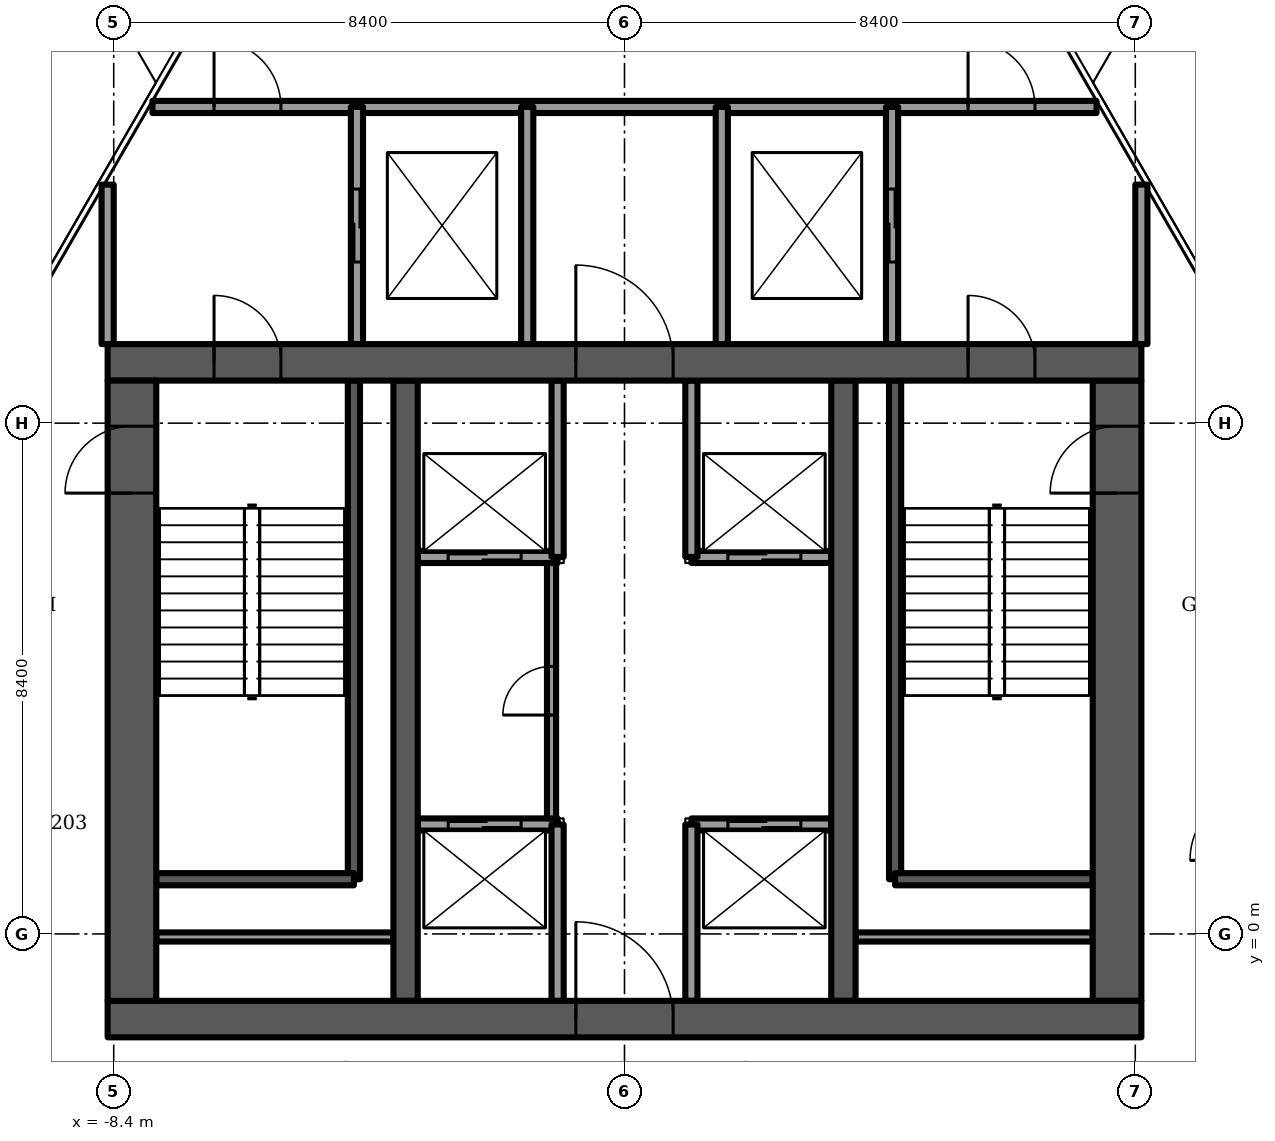
"""IFC4 building model, lengths in metres.
Left out: names, types, materials, properties, quantities, classifications, styles, units other than length and angle.
Written with IfcOpenShell. Run it as: python <this file> out.ifc"""

import sys

from ifc_helpers import new_model, si_unit, direction, frame, frame_2d, origin, place, context, subcontext, project, spatial, rectangle, extrude, element, fill, save


model = new_model("IFC4")
c1 = context("Model", 3, precision=1e-05, world=origin(), true_north=direction((0.0, 1.0)))
c2 = subcontext(c1, "Body", "Model", "MODEL_VIEW")
j1 = project(units=[si_unit("LENGTHUNIT", "METRE"), si_unit("PLANEANGLEUNIT", "RADIAN")], contexts=[c1])
p1 = place(None, origin())
s1 = spatial("IfcSite", under=j1, at=p1, CompositionType="ELEMENT")
p2 = place(p1, origin())
s2 = spatial("IfcBuilding", under=s1, at=p2, CompositionType="ELEMENT")
p3 = place(p2, frame((0.0, 0.0, 237.0)))
s3 = spatial("IfcBuildingStorey", under=s2, at=p3, CompositionType="ELEMENT", Elevation=237.0)
p4 = place(p3, frame((-8.5, -1.4, -0.3), z_axis=(0.0, 0.0, 1.0), x_axis=(1.0, 0.0, 0.0)))
e1 = element("IfcWall", 1, at=p4, inside=s3, PredefinedType="SHEAR", context=c2, shape_type="SweptSolid", body=[
    extrude(rectangle(XDim=17.0, YDim=0.6, at=frame_2d((8.5, 0.0))), origin(), (0.0, 0.0, 1.0), 8.0),
])
p5 = place(p4, frame((7.7, 0.0, 0.0)))
e2 = element("IfcOpeningElement", 2, at=p5, cuts=e1, PredefinedType="OPENING", context=c2, shape_type="SweptSolid", body=[
    extrude(rectangle(XDim=1.6, YDim=2.1, at=frame_2d((0.8, 1.05))), frame((0.0, 0.3, 0.0), z_axis=(0.0, -1.0, 0.0), x_axis=(1.0, 0.0, 0.0)), (0.0, 0.0, 1.0), 0.6),
])
p6 = place(p3, frame((-8.5, 9.4, -0.3), z_axis=(0.0, 0.0, 1.0), x_axis=(1.0, 0.0, 0.0)))
e3 = element("IfcWall", 3, at=p6, inside=s3, PredefinedType="SHEAR", context=c2, shape_type="SweptSolid", body=[
    extrude(rectangle(XDim=17.0, YDim=0.6, at=frame_2d((8.5, 0.0))), origin(), (0.0, 0.0, 1.0), 8.0),
])
p7 = place(p6, frame((7.7, 0.0, 0.0)))
e4 = element("IfcOpeningElement", 4, at=p7, cuts=e3, PredefinedType="OPENING", context=c2, shape_type="SweptSolid", body=[
    extrude(rectangle(XDim=1.6, YDim=2.1, at=frame_2d((0.8, 1.05))), frame((0.0, 0.3, 0.0), z_axis=(0.0, -1.0, 0.0), x_axis=(1.0, 0.0, 0.0)), (0.0, 0.0, 1.0), 0.6),
])
p8 = place(p6, frame((1.75, 0.0, 0.0)))
e5 = element("IfcOpeningElement", 5, at=p8, cuts=e3, PredefinedType="OPENING", context=c2, shape_type="SweptSolid", body=[
    extrude(rectangle(XDim=1.1, YDim=2.1, at=frame_2d((0.55, 1.05))), frame((0.0, 0.3, 0.0), z_axis=(0.0, -1.0, 0.0), x_axis=(1.0, 0.0, 0.0)), (0.0, 0.0, 1.0), 0.6),
])
p9 = place(p6, frame((14.15, 0.0, 0.0)))
e6 = element("IfcOpeningElement", 6, at=p9, cuts=e3, PredefinedType="OPENING", context=c2, shape_type="SweptSolid", body=[
    extrude(rectangle(XDim=1.1, YDim=2.1, at=frame_2d((0.55, 1.05))), frame((0.0, 0.3, 0.0), z_axis=(0.0, -1.0, 0.0), x_axis=(1.0, 0.0, 0.0)), (0.0, 0.0, 1.0), 0.6),
])
p10 = place(p3, frame((-8.1, -1.1, -0.3), z_axis=(0.0, 0.0, 1.0), x_axis=(0.0, 1.0, 0.0)))
e7 = element("IfcWall", 7, at=p10, inside=s3, PredefinedType="SHEAR", context=c2, shape_type="SweptSolid", body=[
    extrude(rectangle(XDim=10.2, YDim=0.8, at=frame_2d((5.1, 0.0))), origin(), (0.0, 0.0, 1.0), 8.0),
])
p11 = place(p10, frame((8.35, 0.0, 0.0)))
e8 = element("IfcOpeningElement", 8, at=p11, cuts=e7, PredefinedType="OPENING", context=c2, shape_type="SweptSolid", body=[
    extrude(rectangle(XDim=1.1, YDim=2.1, at=frame_2d((0.55, 1.05))), frame((0.0, 0.4, 0.0), z_axis=(0.0, -1.0, 0.0), x_axis=(1.0, 0.0, 0.0)), (0.0, 0.0, 1.0), 0.8),
])
p12 = place(p3, frame((8.1, -1.1, -0.3), z_axis=(0.0, 0.0, 1.0), x_axis=(0.0, 1.0, 0.0)))
e9 = element("IfcWall", 9, at=p12, inside=s3, PredefinedType="SHEAR", context=c2, shape_type="SweptSolid", body=[
    extrude(rectangle(XDim=10.2, YDim=0.8, at=frame_2d((5.1, 0.0))), origin(), (0.0, 0.0, 1.0), 8.0),
])
p13 = place(p12, frame((8.35, 0.0, 0.0)))
e10 = element("IfcOpeningElement", 10, at=p13, cuts=e9, PredefinedType="OPENING", context=c2, shape_type="SweptSolid", body=[
    extrude(rectangle(XDim=1.1, YDim=2.1, at=frame_2d((0.55, 1.05))), frame((0.0, 0.4, 0.0), z_axis=(0.0, -1.0, 0.0), x_axis=(1.0, 0.0, 0.0)), (0.0, 0.0, 1.0), 0.8),
])
for number, where, z_axis, x_axis in (
    (11, (-3.6, -1.1, -0.3), (0.0, 0.0, 1.0), (0.0, 1.0, 0.0)),
    (12, (3.6, -1.1, -0.3), (0.0, 0.0, 1.0), (0.0, 1.0, 0.0)),
):
    element("IfcWall", number, at=place(p3, frame(where, z_axis=z_axis, x_axis=x_axis)), inside=s3, PredefinedType="SHEAR", context=c2, shape_type="SweptSolid", body=[
        extrude(rectangle(XDim=10.2, YDim=0.4, at=frame_2d((5.1, 0.0))), origin(), (0.0, 0.0, 1.0), 8.0),
    ])
p14 = place(p3, frame((-3.4, 1.8, 0.0), z_axis=(0.0, 0.0, 1.0), x_axis=(1.0, 0.0, 0.0)))
e13 = element("IfcWall", 13, at=p14, inside=s3, PredefinedType="PARTITIONING", context=c2, shape_type="SweptSolid", body=[
    extrude(rectangle(XDim=2.3, YDim=0.2, at=frame_2d((1.15, 0.0))), origin(), (0.0, 0.0, 1.0), 7.7),
])
p15 = place(p14, frame((0.5, 0.0, 0.0)))
e14 = element("IfcOpeningElement", 14, at=p15, cuts=e13, PredefinedType="OPENING", context=c2, shape_type="SweptSolid", body=[
    extrude(rectangle(XDim=1.2, YDim=2.1, at=frame_2d((0.6, 1.05))), frame((0.0, 0.1, 0.0), z_axis=(0.0, -1.0, 0.0), x_axis=(1.0, 0.0, 0.0)), (0.0, 0.0, 1.0), 0.2),
])
p16 = place(p3, frame((-3.4, 6.2, 0.0), z_axis=(0.0, 0.0, 1.0), x_axis=(1.0, 0.0, 0.0)))
e15 = element("IfcWall", 15, at=p16, inside=s3, PredefinedType="PARTITIONING", context=c2, shape_type="SweptSolid", body=[
    extrude(rectangle(XDim=2.3, YDim=0.2, at=frame_2d((1.15, 0.0))), origin(), (0.0, 0.0, 1.0), 7.7),
])
p17 = place(p16, frame((0.5, 0.0, 0.0)))
e16 = element("IfcOpeningElement", 16, at=p17, cuts=e15, PredefinedType="OPENING", context=c2, shape_type="SweptSolid", body=[
    extrude(rectangle(XDim=1.2, YDim=2.1, at=frame_2d((0.6, 1.05))), frame((0.0, 0.1, 0.0), z_axis=(0.0, -1.0, 0.0), x_axis=(1.0, 0.0, 0.0)), (0.0, 0.0, 1.0), 0.2),
])
p18 = place(p3, frame((1.1, 1.8, 0.0), z_axis=(0.0, 0.0, 1.0), x_axis=(1.0, 0.0, 0.0)))
e17 = element("IfcWall", 17, at=p18, inside=s3, PredefinedType="PARTITIONING", context=c2, shape_type="SweptSolid", body=[
    extrude(rectangle(XDim=2.3, YDim=0.2, at=frame_2d((1.15, 0.0))), origin(), (0.0, 0.0, 1.0), 7.7),
])
p19 = place(p18, frame((0.6, 0.0, 0.0)))
e18 = element("IfcOpeningElement", 18, at=p19, cuts=e17, PredefinedType="OPENING", context=c2, shape_type="SweptSolid", body=[
    extrude(rectangle(XDim=1.2, YDim=2.1, at=frame_2d((0.6, 1.05))), frame((0.0, 0.1, 0.0), z_axis=(0.0, -1.0, 0.0), x_axis=(1.0, 0.0, 0.0)), (0.0, 0.0, 1.0), 0.2),
])
p20 = place(p3, frame((1.1, 6.2, 0.0), z_axis=(0.0, 0.0, 1.0), x_axis=(1.0, 0.0, 0.0)))
e19 = element("IfcWall", 19, at=p20, inside=s3, PredefinedType="PARTITIONING", context=c2, shape_type="SweptSolid", body=[
    extrude(rectangle(XDim=2.3, YDim=0.2, at=frame_2d((1.15, 0.0))), origin(), (0.0, 0.0, 1.0), 7.7),
])
p21 = place(p20, frame((0.6, 0.0, 0.0)))
e20 = element("IfcOpeningElement", 20, at=p21, cuts=e19, PredefinedType="OPENING", context=c2, shape_type="SweptSolid", body=[
    extrude(rectangle(XDim=1.2, YDim=2.1, at=frame_2d((0.6, 1.05))), frame((0.0, 0.1, 0.0), z_axis=(0.0, -1.0, 0.0), x_axis=(1.0, 0.0, 0.0)), (0.0, 0.0, 1.0), 0.2),
])
for number, where, z_axis, x_axis in (
    (21, (-1.1, -1.1, 0.0), (0.0, 0.0, 1.0), (0.0, 1.0, 0.0)),
    (22, (1.1, -1.1, 0.0), (0.0, 0.0, 1.0), (0.0, 1.0, 0.0)),
    (23, (-1.1, 6.2, 0.0), (0.0, 0.0, 1.0), (0.0, 1.0, 0.0)),
    (24, (1.1, 6.2, 0.0), (0.0, 0.0, 1.0), (0.0, 1.0, 0.0)),
):
    element("IfcWall", number, at=place(p3, frame(where, z_axis=z_axis, x_axis=x_axis)), inside=s3, PredefinedType="PARTITIONING", context=c2, shape_type="SweptSolid", body=[
        extrude(rectangle(XDim=2.9, YDim=0.2, at=frame_2d((1.45, 0.0))), origin(), (0.0, 0.0, 1.0), 7.7),
    ])
p22 = place(p3, frame((-4.45, 0.9, -0.3), z_axis=(0.0, 0.0, 1.0), x_axis=(0.0, 1.0, 0.0)))
e25 = element("IfcWall", 25, at=p22, inside=s3, PredefinedType="SOLIDWALL", context=c2, shape_type="SweptSolid", body=[
    extrude(rectangle(XDim=8.2, YDim=0.2, at=frame_2d((4.1, 0.0))), origin(), (0.0, 0.0, 1.0), 8.0),
])
p23 = place(p3, frame((-7.7, 0.9, -0.3), z_axis=(0.0, 0.0, 1.0), x_axis=(1.0, 0.0, 0.0)))
e26 = element("IfcWall", 26, at=p23, inside=s3, PredefinedType="SOLIDWALL", context=c2, shape_type="SweptSolid", body=[
    extrude(rectangle(XDim=3.25, YDim=0.2, at=frame_2d((1.625, 0.0))), origin(), (0.0, 0.0, 1.0), 8.0),
])
p24 = place(p3, frame((-7.7, -0.05, 0.0), z_axis=(0.0, 0.0, 1.0), x_axis=(1.0, 0.0, 0.0)))
e27 = element("IfcWall", 27, at=p24, inside=s3, PredefinedType="PARTITIONING", context=c2, shape_type="SweptSolid", body=[
    extrude(rectangle(XDim=3.9, YDim=0.15, at=frame_2d((1.95, 0.0))), origin(), (0.0, 0.0, 1.0), 7.7),
])
p25 = place(p3, frame((4.45, 0.9, -0.3), z_axis=(0.0, 0.0, 1.0), x_axis=(0.0, 1.0, 0.0)))
e28 = element("IfcWall", 28, at=p25, inside=s3, PredefinedType="SOLIDWALL", context=c2, shape_type="SweptSolid", body=[
    extrude(rectangle(XDim=8.2, YDim=0.2, at=frame_2d((4.1, 0.0))), origin(), (0.0, 0.0, 1.0), 8.0),
])
p26 = place(p3, frame((4.45, 0.9, -0.3), z_axis=(0.0, 0.0, 1.0), x_axis=(1.0, 0.0, 0.0)))
e29 = element("IfcWall", 29, at=p26, inside=s3, PredefinedType="SOLIDWALL", context=c2, shape_type="SweptSolid", body=[
    extrude(rectangle(XDim=3.25, YDim=0.2, at=frame_2d((1.625, 0.0))), origin(), (0.0, 0.0, 1.0), 8.0),
])
p27 = place(p3, frame((3.8, -0.05, 0.0), z_axis=(0.0, 0.0, 1.0), x_axis=(1.0, 0.0, 0.0)))
e30 = element("IfcWall", 30, at=p27, inside=s3, PredefinedType="PARTITIONING", context=c2, shape_type="SweptSolid", body=[
    extrude(rectangle(XDim=3.9, YDim=0.15, at=frame_2d((1.95, 0.0))), origin(), (0.0, 0.0, 1.0), 7.7),
])
p28 = place(p3, frame((-7.763, 13.6, 0.0), z_axis=(0.0, 0.0, 1.0), x_axis=(1.0, 0.0, 0.0)))
e31 = element("IfcWall", 31, at=p28, inside=s3, PredefinedType="PARTITIONING", context=c2, shape_type="SweptSolid", body=[
    extrude(rectangle(XDim=15.525, YDim=0.2, at=frame_2d((7.763, 0.0))), origin(), (0.0, 0.0, 1.0), 7.7),
])
p29 = place(p28, frame((1.013, 0.0, 0.0)))
e32 = element("IfcOpeningElement", 32, at=p29, cuts=e31, PredefinedType="OPENING", context=c2, shape_type="SweptSolid", body=[
    extrude(rectangle(XDim=1.1, YDim=2.1, at=frame_2d((0.55, 1.05))), frame((0.0, 0.1, 0.0), z_axis=(0.0, -1.0, 0.0), x_axis=(1.0, 0.0, 0.0)), (0.0, 0.0, 1.0), 0.2),
])
p30 = place(p28, frame((13.413, 0.0, 0.0)))
e33 = element("IfcOpeningElement", 33, at=p30, cuts=e31, PredefinedType="OPENING", context=c2, shape_type="SweptSolid", body=[
    extrude(rectangle(XDim=1.1, YDim=2.1, at=frame_2d((0.55, 1.05))), frame((0.0, 0.1, 0.0), z_axis=(0.0, -1.0, 0.0), x_axis=(1.0, 0.0, 0.0)), (0.0, 0.0, 1.0), 0.2),
])
for number, where, z_axis, x_axis in (
    (34, (-8.5, 9.7, 0.0), (0.0, 0.0, 1.0), (0.0, 1.0, 0.0)),
    (35, (8.5, 9.7, 0.0), (0.0, 0.0, 1.0), (0.0, 1.0, 0.0)),
):
    element("IfcWall", number, at=place(p3, frame(where, z_axis=z_axis, x_axis=x_axis)), inside=s3, PredefinedType="PARTITIONING", context=c2, shape_type="SweptSolid", body=[
        extrude(rectangle(XDim=2.623, YDim=0.2, at=frame_2d((1.312, 0.0))), origin(), (0.0, 0.0, 1.0), 7.7),
    ])
p31 = place(p3, frame((-4.4, 9.7, 0.0), z_axis=(0.0, 0.0, 1.0), x_axis=(0.0, 1.0, 0.0)))
e36 = element("IfcWall", 36, at=p31, inside=s3, PredefinedType="PARTITIONING", context=c2, shape_type="SweptSolid", body=[
    extrude(rectangle(XDim=3.9, YDim=0.2, at=frame_2d((1.95, 0.0))), origin(), (0.0, 0.0, 1.0), 7.7),
])
p32 = place(p31, frame((1.35, 0.0, 0.0)))
e37 = element("IfcOpeningElement", 37, at=p32, cuts=e36, PredefinedType="OPENING", context=c2, shape_type="SweptSolid", body=[
    extrude(rectangle(XDim=1.2, YDim=2.1, at=frame_2d((0.6, 1.05))), frame((0.0, 0.1, 0.0), z_axis=(0.0, -1.0, 0.0), x_axis=(1.0, 0.0, 0.0)), (0.0, 0.0, 1.0), 0.2),
])
p33 = place(p3, frame((4.4, 9.7, 0.0), z_axis=(0.0, 0.0, 1.0), x_axis=(0.0, 1.0, 0.0)))
e38 = element("IfcWall", 38, at=p33, inside=s3, PredefinedType="PARTITIONING", context=c2, shape_type="SweptSolid", body=[
    extrude(rectangle(XDim=3.9, YDim=0.2, at=frame_2d((1.95, 0.0))), origin(), (0.0, 0.0, 1.0), 7.7),
])
p34 = place(p33, frame((1.35, 0.0, 0.0)))
e39 = element("IfcOpeningElement", 39, at=p34, cuts=e38, PredefinedType="OPENING", context=c2, shape_type="SweptSolid", body=[
    extrude(rectangle(XDim=1.2, YDim=2.1, at=frame_2d((0.6, 1.05))), frame((0.0, 0.1, 0.0), z_axis=(0.0, -1.0, 0.0), x_axis=(1.0, 0.0, 0.0)), (0.0, 0.0, 1.0), 0.2),
])
for number, where, z_axis, x_axis in (
    (40, (-1.6, 9.7, 0.0), (0.0, 0.0, 1.0), (0.0, 1.0, 0.0)),
    (41, (1.6, 9.7, 0.0), (0.0, 0.0, 1.0), (0.0, 1.0, 0.0)),
):
    element("IfcWall", number, at=place(p3, frame(where, z_axis=z_axis, x_axis=x_axis)), inside=s3, PredefinedType="PARTITIONING", context=c2, shape_type="SweptSolid", body=[
        extrude(rectangle(XDim=3.9, YDim=0.2, at=frame_2d((1.95, 0.0))), origin(), (0.0, 0.0, 1.0), 7.7),
    ])
p35 = place(p3, frame((-1.2, 1.9, 0.0), z_axis=(0.0, 0.0, 1.0), x_axis=(0.0, 1.0, 0.0)))
e42 = element("IfcWall", 42, at=p35, inside=s3, PredefinedType="PARTITIONING", context=c2, shape_type="SweptSolid", body=[
    extrude(rectangle(XDim=4.2, YDim=0.15, at=frame_2d((2.1, 0.0))), origin(), (0.0, 0.0, 1.0), 7.7),
])
p36 = place(p35, frame((1.7, 0.0, 0.0)))
e43 = element("IfcOpeningElement", 43, at=p36, cuts=e42, PredefinedType="OPENING", context=c2, shape_type="SweptSolid", body=[
    extrude(rectangle(XDim=0.8, YDim=2.1, at=frame_2d((0.4, 1.05))), frame((0.0, 0.075, 0.0), z_axis=(0.0, -1.0, 0.0), x_axis=(1.0, 0.0, 0.0)), (0.0, 0.0, 1.0), 0.15),
])
p37 = place(p15, origin())
e44 = element("IfcDoor", 44, at=p37, inside=s3, OperationType="SLIDING_TO_LEFT", PredefinedType="DOOR", context=c2, shape_type="SweptSolid", body=[
    extrude(rectangle(XDim=1.2, YDim=2.1, at=frame_2d((0.6, 1.05))), frame((0.0, 0.025, 0.0), z_axis=(0.0, -1.0, 0.0), x_axis=(1.0, 0.0, 0.0)), (0.0, 0.0, 1.0), 0.05),
])
fill(e14, e44)
p38 = place(p19, origin())
e45 = element("IfcDoor", 45, at=p38, inside=s3, OperationType="SLIDING_TO_LEFT", PredefinedType="DOOR", context=c2, shape_type="SweptSolid", body=[
    extrude(rectangle(XDim=1.2, YDim=2.1, at=frame_2d((0.6, 1.05))), frame((0.0, 0.025, 0.0), z_axis=(0.0, -1.0, 0.0), x_axis=(1.0, 0.0, 0.0)), (0.0, 0.0, 1.0), 0.05),
])
fill(e18, e45)
p39 = place(p17, origin())
e46 = element("IfcDoor", 46, at=p39, inside=s3, OperationType="SLIDING_TO_LEFT", PredefinedType="DOOR", context=c2, shape_type="SweptSolid", body=[
    extrude(rectangle(XDim=1.2, YDim=2.1, at=frame_2d((0.6, 1.05))), frame((0.0, 0.025, 0.0), z_axis=(0.0, -1.0, 0.0), x_axis=(1.0, 0.0, 0.0)), (0.0, 0.0, 1.0), 0.05),
])
fill(e16, e46)
p40 = place(p21, origin())
e47 = element("IfcDoor", 47, at=p40, inside=s3, OperationType="SLIDING_TO_LEFT", PredefinedType="DOOR", context=c2, shape_type="SweptSolid", body=[
    extrude(rectangle(XDim=1.2, YDim=2.1, at=frame_2d((0.6, 1.05))), frame((0.0, 0.025, 0.0), z_axis=(0.0, -1.0, 0.0), x_axis=(1.0, 0.0, 0.0)), (0.0, 0.0, 1.0), 0.05),
])
fill(e20, e47)
p41 = place(p5, origin())
e48 = element("IfcDoor", 48, at=p41, inside=s3, OperationType="DOUBLE_DOOR_SINGLE_SWING", PredefinedType="DOOR", context=c2, shape_type="SweptSolid", body=[
    extrude(rectangle(XDim=1.6, YDim=2.1, at=frame_2d((0.8, 1.05))), frame((0.0, 0.025, 0.0), z_axis=(0.0, -1.0, 0.0), x_axis=(1.0, 0.0, 0.0)), (0.0, 0.0, 1.0), 0.05),
])
fill(e2, e48)
p42 = place(p7, origin())
e49 = element("IfcDoor", 49, at=p42, inside=s3, OperationType="DOUBLE_DOOR_SINGLE_SWING", PredefinedType="DOOR", context=c2, shape_type="SweptSolid", body=[
    extrude(rectangle(XDim=1.6, YDim=2.1, at=frame_2d((0.8, 1.05))), frame((0.0, 0.025, 0.0), z_axis=(0.0, -1.0, 0.0), x_axis=(1.0, 0.0, 0.0)), (0.0, 0.0, 1.0), 0.05),
])
fill(e4, e49)
p43 = place(p8, origin())
e50 = element("IfcDoor", 50, at=p43, inside=s3, OperationType="SINGLE_SWING_LEFT", PredefinedType="DOOR", context=c2, shape_type="SweptSolid", body=[
    extrude(rectangle(XDim=1.1, YDim=2.1, at=frame_2d((0.55, 1.05))), frame((0.0, 0.025, 0.0), z_axis=(0.0, -1.0, 0.0), x_axis=(1.0, 0.0, 0.0)), (0.0, 0.0, 1.0), 0.05),
])
fill(e5, e50)
p44 = place(p11, origin())
e51 = element("IfcDoor", 51, at=p44, inside=s3, OperationType="SINGLE_SWING_RIGHT", PredefinedType="DOOR", context=c2, shape_type="SweptSolid", body=[
    extrude(rectangle(XDim=1.1, YDim=2.1, at=frame_2d((0.55, 1.05))), frame((0.0, 0.025, 0.0), z_axis=(0.0, -1.0, 0.0), x_axis=(1.0, 0.0, 0.0)), (0.0, 0.0, 1.0), 0.05),
])
fill(e8, e51)
p45 = place(p9, origin())
e52 = element("IfcDoor", 52, at=p45, inside=s3, OperationType="SINGLE_SWING_RIGHT", PredefinedType="DOOR", context=c2, shape_type="SweptSolid", body=[
    extrude(rectangle(XDim=1.1, YDim=2.1, at=frame_2d((0.55, 1.05))), frame((0.0, 0.025, 0.0), z_axis=(0.0, -1.0, 0.0), x_axis=(1.0, 0.0, 0.0)), (0.0, 0.0, 1.0), 0.05),
])
fill(e6, e52)
p46 = place(p13, origin())
e53 = element("IfcDoor", 53, at=p46, inside=s3, OperationType="SINGLE_SWING_LEFT", PredefinedType="DOOR", context=c2, shape_type="SweptSolid", body=[
    extrude(rectangle(XDim=1.1, YDim=2.1, at=frame_2d((0.55, 1.05))), frame((0.0, 0.025, 0.0), z_axis=(0.0, -1.0, 0.0), x_axis=(1.0, 0.0, 0.0)), (0.0, 0.0, 1.0), 0.05),
])
fill(e10, e53)
p47 = place(p32, origin())
e54 = element("IfcDoor", 54, at=p47, inside=s3, OperationType="SLIDING_TO_LEFT", PredefinedType="DOOR", context=c2, shape_type="SweptSolid", body=[
    extrude(rectangle(XDim=1.2, YDim=2.1, at=frame_2d((0.6, 1.05))), frame((0.0, 0.025, 0.0), z_axis=(0.0, -1.0, 0.0), x_axis=(1.0, 0.0, 0.0)), (0.0, 0.0, 1.0), 0.05),
])
fill(e37, e54)
p48 = place(p34, origin())
e55 = element("IfcDoor", 55, at=p48, inside=s3, OperationType="SLIDING_TO_LEFT", PredefinedType="DOOR", context=c2, shape_type="SweptSolid", body=[
    extrude(rectangle(XDim=1.2, YDim=2.1, at=frame_2d((0.6, 1.05))), frame((0.0, 0.025, 0.0), z_axis=(0.0, -1.0, 0.0), x_axis=(1.0, 0.0, 0.0)), (0.0, 0.0, 1.0), 0.05),
])
fill(e39, e55)
p49 = place(p36, origin())
e56 = element("IfcDoor", 56, at=p49, inside=s3, OperationType="SINGLE_SWING_LEFT", PredefinedType="DOOR", context=c2, shape_type="SweptSolid", body=[
    extrude(rectangle(XDim=0.8, YDim=2.1, at=frame_2d((0.4, 1.05))), frame((0.0, 0.025, 0.0), z_axis=(0.0, -1.0, 0.0), x_axis=(1.0, 0.0, 0.0)), (0.0, 0.0, 1.0), 0.05),
])
fill(e43, e56)
p50 = place(p29, origin())
e57 = element("IfcDoor", 57, at=p50, inside=s3, OperationType="SINGLE_SWING_LEFT", PredefinedType="DOOR", context=c2, shape_type="SweptSolid", body=[
    extrude(rectangle(XDim=1.1, YDim=2.1, at=frame_2d((0.55, 1.05))), frame((0.0, 0.025, 0.0), z_axis=(0.0, -1.0, 0.0), x_axis=(1.0, 0.0, 0.0)), (0.0, 0.0, 1.0), 0.05),
])
fill(e32, e57)
p51 = place(p30, origin())
e58 = element("IfcDoor", 58, at=p51, inside=s3, OperationType="SINGLE_SWING_RIGHT", PredefinedType="DOOR", context=c2, shape_type="SweptSolid", body=[
    extrude(rectangle(XDim=1.1, YDim=2.1, at=frame_2d((0.55, 1.05))), frame((0.0, 0.025, 0.0), z_axis=(0.0, -1.0, 0.0), x_axis=(1.0, 0.0, 0.0)), (0.0, 0.0, 1.0), 0.05),
])
fill(e33, e58)
save(model, sys.argv[1])
